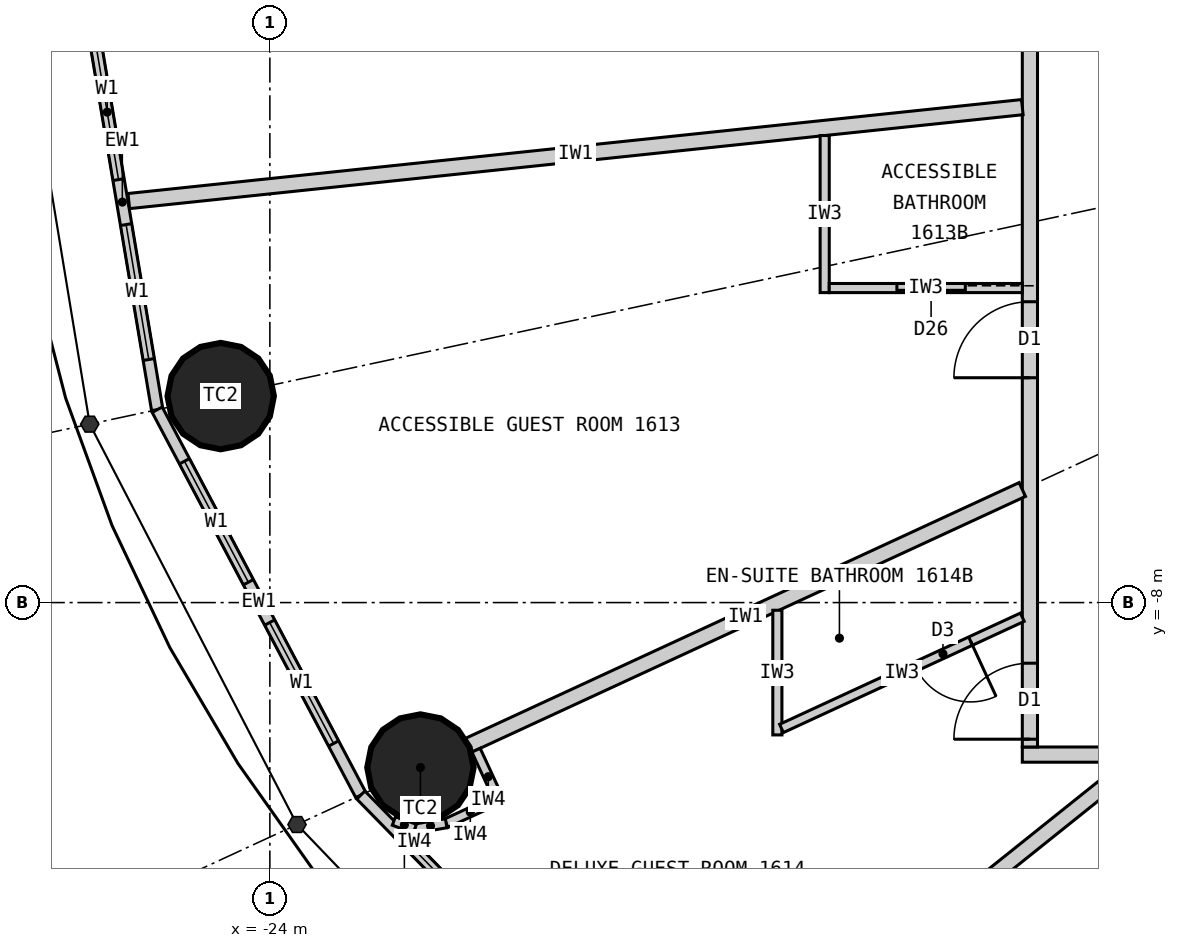
"""IFC4 building model, lengths in metres.
Left out: names, types, materials, properties, quantities, classifications, styles, units other than length and angle.
Written with IfcOpenShell. Run it as: python <this file> out.ifc"""

import sys

from ifc_helpers import new_model, si_unit, direction, frame, frame_2d, origin, origin_2d, place, context, subcontext, project, spatial, rectangle, circle, extrude, element, fill, save


model = new_model("IFC4")
c1 = context("Model", 3, precision=1e-05, world=origin(), true_north=direction((0.0, 1.0)))
c2 = subcontext(c1, "Body", "Model", "MODEL_VIEW")
j1 = project(units=[si_unit("LENGTHUNIT", "METRE"), si_unit("PLANEANGLEUNIT", "RADIAN")], contexts=[c1])
p1 = place(None, origin())
s1 = spatial("IfcSite", under=j1, at=p1, CompositionType="ELEMENT")
p2 = place(p1, origin())
s2 = spatial("IfcBuilding", under=s1, at=p2, CompositionType="ELEMENT")
p3 = place(p2, frame((0.0, 0.0, 67.2)))
s3 = spatial("IfcBuildingStorey", under=s2, at=p3, CompositionType="ELEMENT", Elevation=67.2)
for number, where, z_axis, x_axis in (
    (1, (-24.647, -5.283, 0.0), (0.0, 0.0, 1.0), (1.0, 0.0, 0.0)),
    (2, (-22.019, -10.17, 0.0), (0.0, 0.0, 1.0), (1.0, 0.0, 0.0)),
):
    element("IfcColumn", number, at=place(p3, frame(where, z_axis=z_axis, x_axis=x_axis)), inside=s3, PredefinedType="COLUMN", context=c2, shape_type="SweptSolid", body=[
        extrude(circle(Radius=0.7, at=origin_2d()), origin(), (0.0, 0.0, 1.0), 3.3),
    ])
p4 = place(p3, frame((-26.4, 0.0, 0.0), z_axis=(0.0, 0.0, 1.0), x_axis=(0.165642551694, -0.986185857264, 0.0)))
e3 = element("IfcWall", 3, at=p4, inside=s3, PredefinedType="ELEMENTEDWALL", context=c2, shape_type="SweptSolid", body=[
    extrude(rectangle(XDim=5.539, YDim=0.15, at=frame_2d((2.77, 0.0))), origin(), (0.0, 0.0, 1.0), 3.12),
])
p5 = place(p4, frame((0.669, 0.0, 0.9)))
e4 = element("IfcOpeningElement", 4, at=p5, cuts=e3, PredefinedType="OPENING", context=c2, shape_type="SweptSolid", body=[
    extrude(rectangle(XDim=1.8, YDim=1.9, at=frame_2d((0.9, 0.95))), frame((0.0, 0.085, 0.0), z_axis=(0.0, -1.0, 0.0), x_axis=(1.0, 0.0, 0.0)), (0.0, 0.0, 1.0), 0.17),
])
p6 = place(p4, frame((3.07, 0.0, 0.9)))
e5 = element("IfcOpeningElement", 5, at=p6, cuts=e3, PredefinedType="OPENING", context=c2, shape_type="SweptSolid", body=[
    extrude(rectangle(XDim=1.8, YDim=1.9, at=frame_2d((0.9, 0.95))), frame((0.0, 0.085, 0.0), z_axis=(0.0, -1.0, 0.0), x_axis=(1.0, 0.0, 0.0)), (0.0, 0.0, 1.0), 0.17),
])
p7 = place(p3, frame((-25.482, -5.462, 0.0), z_axis=(0.0, 0.0, 1.0), x_axis=(0.467296867008, -0.884100468321, 0.0)))
e6 = element("IfcWall", 6, at=p7, inside=s3, PredefinedType="ELEMENTEDWALL", context=c2, shape_type="SweptSolid", body=[
    extrude(rectangle(XDim=5.734, YDim=0.15, at=frame_2d((2.867, 0.0))), origin(), (0.0, 0.0, 1.0), 3.12),
])
p8 = place(p7, frame((0.767, 0.0, 0.9)))
e7 = element("IfcOpeningElement", 7, at=p8, cuts=e6, PredefinedType="OPENING", context=c2, shape_type="SweptSolid", body=[
    extrude(rectangle(XDim=1.8, YDim=1.9, at=frame_2d((0.9, 0.95))), frame((0.0, 0.085, 0.0), z_axis=(0.0, -1.0, 0.0), x_axis=(1.0, 0.0, 0.0)), (0.0, 0.0, 1.0), 0.17),
])
p9 = place(p7, frame((3.167, 0.0, 0.9)))
e8 = element("IfcOpeningElement", 8, at=p9, cuts=e6, PredefinedType="OPENING", context=c2, shape_type="SweptSolid", body=[
    extrude(rectangle(XDim=1.8, YDim=1.9, at=frame_2d((0.9, 0.95))), frame((0.0, 0.085, 0.0), z_axis=(0.0, -1.0, 0.0), x_axis=(1.0, 0.0, 0.0)), (0.0, 0.0, 1.0), 0.17),
])
p10 = place(p3, frame((-22.803, -10.532, 0.0), z_axis=(0.0, 0.0, 1.0), x_axis=(0.699602905915, -0.714531856557, 0.0)))
e9 = element("IfcWall", 9, at=p10, inside=s3, PredefinedType="ELEMENTEDWALL", context=c2, shape_type="SweptSolid", body=[
    extrude(rectangle(XDim=6.051, YDim=0.15, at=frame_2d((3.025, 0.0))), origin(), (0.0, 0.0, 1.0), 3.12),
])
p11 = place(p10, frame((0.926, 0.0, 0.9)))
e10 = element("IfcOpeningElement", 10, at=p11, cuts=e9, PredefinedType="OPENING", context=c2, shape_type="SweptSolid", body=[
    extrude(rectangle(XDim=1.8, YDim=1.9, at=frame_2d((0.9, 0.95))), frame((0.0, 0.085, 0.0), z_axis=(0.0, -1.0, 0.0), x_axis=(1.0, 0.0, 0.0)), (0.0, 0.0, 1.0), 0.17),
])
p12 = place(p10, frame((3.325, 0.0, 0.9)))
e11 = element("IfcOpeningElement", 11, at=p12, cuts=e9, PredefinedType="OPENING", context=c2, shape_type="SweptSolid", body=[
    extrude(rectangle(XDim=1.8, YDim=1.9, at=frame_2d((0.9, 0.95))), frame((0.0, 0.085, 0.0), z_axis=(0.0, -1.0, 0.0), x_axis=(1.0, 0.0, 0.0)), (0.0, 0.0, 1.0), 0.17),
])
p13 = place(p3, frame((14.1, -10.0, 0.0), z_axis=(0.0, 0.0, 1.0), x_axis=(-1.0, 0.0, 0.0)))
e12 = element("IfcWall", 12, at=p13, inside=s3, PredefinedType="PARTITIONING", context=c2, shape_type="SweptSolid", body=[
    extrude(rectangle(XDim=28.2, YDim=0.2, at=frame_2d((14.1, 0.0))), origin(), (0.0, 0.0, 1.0), 3.12),
])
p14 = place(p13, frame((23.865, 0.0, 0.0)))
e13 = element("IfcOpeningElement", 13, at=p14, cuts=e12, PredefinedType="OPENING", context=c2, shape_type="SweptSolid", body=[
    extrude(rectangle(XDim=1.0, YDim=2.2, at=frame_2d((0.5, 1.1))), frame((0.0, 0.11, 0.0), z_axis=(0.0, -1.0, 0.0), x_axis=(1.0, 0.0, 0.0)), (0.0, 0.0, 1.0), 0.22),
])
p15 = place(p13, frame((18.529, 0.0, 0.0)))
e14 = element("IfcOpeningElement", 14, at=p15, cuts=e12, PredefinedType="OPENING", context=c2, shape_type="SweptSolid", body=[
    extrude(rectangle(XDim=1.0, YDim=2.2, at=frame_2d((0.5, 1.1))), frame((0.0, 0.11, 0.0), z_axis=(0.0, -1.0, 0.0), x_axis=(1.0, 0.0, 0.0)), (0.0, 0.0, 1.0), 0.22),
])
p16 = place(p13, frame((14.623, 0.0, 0.0)))
e15 = element("IfcOpeningElement", 15, at=p16, cuts=e12, PredefinedType="OPENING", context=c2, shape_type="SweptSolid", body=[
    extrude(rectangle(XDim=1.0, YDim=2.2, at=frame_2d((0.5, 1.1))), frame((0.0, 0.11, 0.0), z_axis=(0.0, -1.0, 0.0), x_axis=(1.0, 0.0, 0.0)), (0.0, 0.0, 1.0), 0.22),
])
p17 = place(p13, frame((11.24, 0.0, 0.0)))
e16 = element("IfcOpeningElement", 16, at=p17, cuts=e12, PredefinedType="OPENING", context=c2, shape_type="SweptSolid", body=[
    extrude(rectangle(XDim=1.0, YDim=2.2, at=frame_2d((0.5, 1.1))), frame((0.0, 0.11, 0.0), z_axis=(0.0, -1.0, 0.0), x_axis=(1.0, 0.0, 0.0)), (0.0, 0.0, 1.0), 0.22),
])
p18 = place(p13, frame((8.671, 0.0, 0.0)))
e17 = element("IfcOpeningElement", 17, at=p18, cuts=e12, PredefinedType="OPENING", context=c2, shape_type="SweptSolid", body=[
    extrude(rectangle(XDim=1.0, YDim=2.2, at=frame_2d((0.5, 1.1))), frame((0.0, 0.11, 0.0), z_axis=(0.0, -1.0, 0.0), x_axis=(1.0, 0.0, 0.0)), (0.0, 0.0, 1.0), 0.22),
])
p19 = place(p13, frame((2.801, 0.0, 0.0)))
e18 = element("IfcOpeningElement", 18, at=p19, cuts=e12, PredefinedType="OPENING", context=c2, shape_type="SweptSolid", body=[
    extrude(rectangle(XDim=1.0, YDim=2.2, at=frame_2d((0.5, 1.1))), frame((0.0, 0.11, 0.0), z_axis=(0.0, -1.0, 0.0), x_axis=(1.0, 0.0, 0.0)), (0.0, 0.0, 1.0), 0.22),
])
p20 = place(p3, frame((-14.0, 9.9, 0.0), z_axis=(0.0, 0.0, 1.0), x_axis=(0.0, -1.0, 0.0)))
e19 = element("IfcWall", 19, at=p20, inside=s3, PredefinedType="PARTITIONING", context=c2, shape_type="SweptSolid", body=[
    extrude(rectangle(XDim=19.8, YDim=0.2, at=frame_2d((9.9, 0.0))), origin(), (0.0, 0.0, 1.0), 3.12),
])
p21 = place(p20, frame((0.103, 0.0, 0.0)))
e20 = element("IfcOpeningElement", 20, at=p21, cuts=e19, PredefinedType="OPENING", context=c2, shape_type="SweptSolid", body=[
    extrude(rectangle(XDim=1.0, YDim=2.2, at=frame_2d((0.5, 1.1))), frame((0.0, 0.11, 0.0), z_axis=(0.0, -1.0, 0.0), x_axis=(1.0, 0.0, 0.0)), (0.0, 0.0, 1.0), 0.22),
])
p22 = place(p20, frame((5.248, 0.0, 0.0)))
e21 = element("IfcOpeningElement", 21, at=p22, cuts=e19, PredefinedType="OPENING", context=c2, shape_type="SweptSolid", body=[
    extrude(rectangle(XDim=1.0, YDim=2.2, at=frame_2d((0.5, 1.1))), frame((0.0, 0.11, 0.0), z_axis=(0.0, -1.0, 0.0), x_axis=(1.0, 0.0, 0.0)), (0.0, 0.0, 1.0), 0.22),
])
p23 = place(p20, frame((9.438, 0.0, 0.0)))
e22 = element("IfcOpeningElement", 22, at=p23, cuts=e19, PredefinedType="OPENING", context=c2, shape_type="SweptSolid", body=[
    extrude(rectangle(XDim=1.0, YDim=2.2, at=frame_2d((0.5, 1.1))), frame((0.0, 0.11, 0.0), z_axis=(0.0, -1.0, 0.0), x_axis=(1.0, 0.0, 0.0)), (0.0, 0.0, 1.0), 0.22),
])
p24 = place(p20, frame((13.942, 0.0, 0.0)))
e23 = element("IfcOpeningElement", 23, at=p24, cuts=e19, PredefinedType="OPENING", context=c2, shape_type="SweptSolid", body=[
    extrude(rectangle(XDim=1.0, YDim=2.2, at=frame_2d((0.5, 1.1))), frame((0.0, 0.11, 0.0), z_axis=(0.0, -1.0, 0.0), x_axis=(1.0, 0.0, 0.0)), (0.0, 0.0, 1.0), 0.22),
])
p25 = place(p20, frame((18.698, 0.0, 0.0)))
e24 = element("IfcOpeningElement", 24, at=p25, cuts=e19, PredefinedType="OPENING", context=c2, shape_type="SweptSolid", body=[
    extrude(rectangle(XDim=1.0, YDim=2.2, at=frame_2d((0.5, 1.1))), frame((0.0, 0.11, 0.0), z_axis=(0.0, -1.0, 0.0), x_axis=(1.0, 0.0, 0.0)), (0.0, 0.0, 1.0), 0.22),
])
p26 = place(p3, frame((-14.1, -1.482, 0.0), z_axis=(0.0, 0.0, 1.0), x_axis=(-0.994522076235, -0.104526742422, 0.0)))
e25 = element("IfcWall", 25, at=p26, inside=s3, PredefinedType="PARTITIONING", context=c2, shape_type="SweptSolid", body=[
    extrude(rectangle(XDim=11.821, YDim=0.2, at=frame_2d((5.91, 0.0))), origin(), (0.0, 0.0, 1.0), 2.32),
])
p27 = place(p3, frame((-14.1, -6.512, 0.0), z_axis=(0.0, 0.0, 1.0), x_axis=(-0.907832871056, -0.419332181247, 0.0)))
e26 = element("IfcWall", 26, at=p27, inside=s3, PredefinedType="PARTITIONING", context=c2, shape_type="SweptSolid", body=[
    extrude(rectangle(XDim=8.023, YDim=0.2, at=frame_2d((4.011, 0.0))), origin(), (0.0, 0.0, 1.0), 2.32),
])
p28 = place(p3, frame((-12.625, -10.1, 0.0), z_axis=(0.0, 0.0, 1.0), x_axis=(-0.780892451574, -0.624665493744, 0.0)))
e27 = element("IfcWall", 27, at=p28, inside=s3, PredefinedType="PARTITIONING", context=c2, shape_type="SweptSolid", body=[
    extrude(rectangle(XDim=6.045, YDim=0.2, at=frame_2d((3.022, 0.0))), origin(), (0.0, 0.0, 1.0), 2.32),
])
p29 = place(p3, frame((-16.7, -1.855, 0.0), z_axis=(0.0, 0.0, 1.0), x_axis=(0.0, -1.0, 0.0)))
e28 = element("IfcWall", 28, at=p29, inside=s3, PredefinedType="PARTITIONING", context=c2, shape_type="SweptSolid", body=[
    extrude(rectangle(XDim=2.067, YDim=0.12, at=frame_2d((1.033, 0.0))), origin(), (0.0, 0.0, 1.0), 3.12),
])
p30 = place(p3, frame((-14.1, -3.862, 0.0), z_axis=(0.0, 0.0, 1.0), x_axis=(-1.0, 0.0, 0.0)))
e29 = element("IfcWall", 29, at=p30, inside=s3, PredefinedType="PARTITIONING", context=c2, shape_type="SweptSolid", body=[
    extrude(rectangle(XDim=2.54, YDim=0.12, at=frame_2d((1.27, 0.0))), origin(), (0.0, 0.0, 1.0), 2.32),
])
p31 = place(p30, frame((0.75, 0.0, 0.0)))
e30 = element("IfcOpeningElement", 30, at=p31, cuts=e29, PredefinedType="OPENING", context=c2, shape_type="SweptSolid", body=[
    extrude(rectangle(XDim=0.9, YDim=2.1, at=frame_2d((0.45, 1.05))), frame((0.0, 0.07, 0.0), z_axis=(0.0, -1.0, 0.0), x_axis=(1.0, 0.0, 0.0)), (0.0, 0.0, 1.0), 0.14),
])
p32 = place(p3, frame((-17.323, -8.101, 0.0), z_axis=(0.0, 0.0, 1.0), x_axis=(0.0, -1.0, 0.0)))
e31 = element("IfcWall", 31, at=p32, inside=s3, PredefinedType="PARTITIONING", context=c2, shape_type="SweptSolid", body=[
    extrude(rectangle(XDim=1.64, YDim=0.12, at=frame_2d((0.82, 0.0))), origin(), (0.0, 0.0, 1.0), 3.12),
])
p33 = place(p3, frame((-14.1, -8.193, 0.0), z_axis=(0.0, 0.0, 1.0), x_axis=(-0.907836493557, -0.419324338628, 0.0)))
e32 = element("IfcWall", 32, at=p33, inside=s3, PredefinedType="PARTITIONING", context=c2, shape_type="SweptSolid", body=[
    extrude(rectangle(XDim=3.49, YDim=0.12, at=frame_2d((1.745, 0.0))), origin(), (0.0, 0.0, 1.0), 3.12),
])
p34 = place(p33, frame((0.75, 0.0, 0.0)))
e33 = element("IfcOpeningElement", 33, at=p34, cuts=e32, PredefinedType="OPENING", context=c2, shape_type="SweptSolid", body=[
    extrude(rectangle(XDim=0.8, YDim=2.1, at=frame_2d((0.4, 1.05))), frame((0.0, 0.07, 0.0), z_axis=(0.0, -1.0, 0.0), x_axis=(1.0, 0.0, 0.0)), (0.0, 0.0, 1.0), 0.14),
])
p35 = place(p3, frame((-21.287, -9.942, 0.0), z_axis=(0.0, 0.0, 1.0), x_axis=(0.419259891039, -0.907866258744, 0.0)))
e34 = element("IfcWall", 34, at=p35, inside=s3, PredefinedType="PARTITIONING", context=c2, shape_type="SweptSolid", body=[
    extrude(rectangle(XDim=0.768, YDim=0.12, at=frame_2d((0.384, 0.0))), origin(), (0.0, 0.0, 1.0), 3.12),
])
p36 = place(p3, frame((-21.045, -10.61, 0.0), z_axis=(0.0, 0.0, 1.0), x_axis=(-0.907877701396, -0.419235112208, 0.0)))
e35 = element("IfcWall", 35, at=p36, inside=s3, PredefinedType="PARTITIONING", context=c2, shape_type="SweptSolid", body=[
    extrude(rectangle(XDim=0.7, YDim=0.12, at=frame_2d((0.35, 0.0))), origin(), (0.0, 0.0, 1.0), 3.12),
])
p37 = place(p3, frame((-21.68, -10.903, 0.0), z_axis=(0.0, 0.0, 1.0), x_axis=(-0.985446622073, -0.169985161247, 0.0)))
e36 = element("IfcWall", 36, at=p37, inside=s3, PredefinedType="PARTITIONING", context=c2, shape_type="SweptSolid", body=[
    extrude(rectangle(XDim=0.418, YDim=0.12, at=frame_2d((0.209, 0.0))), origin(), (0.0, 0.0, 1.0), 3.12),
])
p38 = place(p3, frame((-22.092, -10.974, 0.0), z_axis=(0.0, 0.0, 1.0), x_axis=(-0.938428160676, 0.345474437912, 0.0)))
e37 = element("IfcWall", 37, at=p38, inside=s3, PredefinedType="PARTITIONING", context=c2, shape_type="SweptSolid", body=[
    extrude(rectangle(XDim=0.294, YDim=0.12, at=frame_2d((0.147, 0.0))), origin(), (0.0, 0.0, 1.0), 3.12),
])
p39 = place(p5, origin())
e38 = element("IfcWindow", 38, at=p39, inside=s3, PartitioningType="SINGLE_PANEL", PredefinedType="WINDOW", context=c2, shape_type="SweptSolid", body=[
    extrude(rectangle(XDim=1.8, YDim=1.9, at=frame_2d((0.9, 0.95))), frame((0.0, 0.03, 0.0), z_axis=(0.0, -1.0, 0.0), x_axis=(1.0, 0.0, 0.0)), (0.0, 0.0, 1.0), 0.06),
])
fill(e4, e38)
p40 = place(p6, origin())
e39 = element("IfcWindow", 39, at=p40, inside=s3, PartitioningType="SINGLE_PANEL", PredefinedType="WINDOW", context=c2, shape_type="SweptSolid", body=[
    extrude(rectangle(XDim=1.8, YDim=1.9, at=frame_2d((0.9, 0.95))), frame((0.0, 0.03, 0.0), z_axis=(0.0, -1.0, 0.0), x_axis=(1.0, 0.0, 0.0)), (0.0, 0.0, 1.0), 0.06),
])
fill(e5, e39)
p41 = place(p8, origin())
e40 = element("IfcWindow", 40, at=p41, inside=s3, PartitioningType="SINGLE_PANEL", PredefinedType="WINDOW", context=c2, shape_type="SweptSolid", body=[
    extrude(rectangle(XDim=1.8, YDim=1.9, at=frame_2d((0.9, 0.95))), frame((0.0, 0.03, 0.0), z_axis=(0.0, -1.0, 0.0), x_axis=(1.0, 0.0, 0.0)), (0.0, 0.0, 1.0), 0.06),
])
fill(e7, e40)
p42 = place(p9, origin())
e41 = element("IfcWindow", 41, at=p42, inside=s3, PartitioningType="SINGLE_PANEL", PredefinedType="WINDOW", context=c2, shape_type="SweptSolid", body=[
    extrude(rectangle(XDim=1.8, YDim=1.9, at=frame_2d((0.9, 0.95))), frame((0.0, 0.03, 0.0), z_axis=(0.0, -1.0, 0.0), x_axis=(1.0, 0.0, 0.0)), (0.0, 0.0, 1.0), 0.06),
])
fill(e8, e41)
p43 = place(p11, origin())
e42 = element("IfcWindow", 42, at=p43, inside=s3, PartitioningType="SINGLE_PANEL", PredefinedType="WINDOW", context=c2, shape_type="SweptSolid", body=[
    extrude(rectangle(XDim=1.8, YDim=1.9, at=frame_2d((0.9, 0.95))), frame((0.0, 0.03, 0.0), z_axis=(0.0, -1.0, 0.0), x_axis=(1.0, 0.0, 0.0)), (0.0, 0.0, 1.0), 0.06),
])
fill(e10, e42)
p44 = place(p31, origin())
e43 = element("IfcDoor", 43, at=p44, inside=s3, OperationType="SLIDING_TO_LEFT", PredefinedType="DOOR", context=c2, shape_type="SweptSolid", body=[
    extrude(rectangle(XDim=0.9, YDim=2.1, at=frame_2d((0.45, 1.05))), frame((0.0, 0.025, 0.0), z_axis=(0.0, -1.0, 0.0), x_axis=(1.0, 0.0, 0.0)), (0.0, 0.0, 1.0), 0.05),
])
fill(e30, e43)
p45 = place(p24, origin())
e44 = element("IfcDoor", 44, at=p45, inside=s3, OperationType="SINGLE_SWING_RIGHT", PredefinedType="DOOR", context=c2, shape_type="SweptSolid", body=[
    extrude(rectangle(XDim=1.0, YDim=2.2, at=frame_2d((0.5, 1.1))), frame((0.0, 0.025, 0.0), z_axis=(0.0, -1.0, 0.0), x_axis=(1.0, 0.0, 0.0)), (0.0, 0.0, 1.0), 0.05),
])
fill(e23, e44)
p46 = place(p34, origin())
e45 = element("IfcDoor", 45, at=p46, inside=s3, OperationType="SINGLE_SWING_LEFT", PredefinedType="DOOR", context=c2, shape_type="SweptSolid", body=[
    extrude(rectangle(XDim=0.8, YDim=2.1, at=frame_2d((0.4, 1.05))), frame((0.0, 0.025, 0.0), z_axis=(0.0, -1.0, 0.0), x_axis=(1.0, 0.0, 0.0)), (0.0, 0.0, 1.0), 0.05),
])
fill(e33, e45)
p47 = place(p25, origin())
e46 = element("IfcDoor", 46, at=p47, inside=s3, OperationType="SINGLE_SWING_RIGHT", PredefinedType="DOOR", context=c2, shape_type="SweptSolid", body=[
    extrude(rectangle(XDim=1.0, YDim=2.2, at=frame_2d((0.5, 1.1))), frame((0.0, 0.025, 0.0), z_axis=(0.0, -1.0, 0.0), x_axis=(1.0, 0.0, 0.0)), (0.0, 0.0, 1.0), 0.05),
])
fill(e24, e46)
save(model, sys.argv[1])
